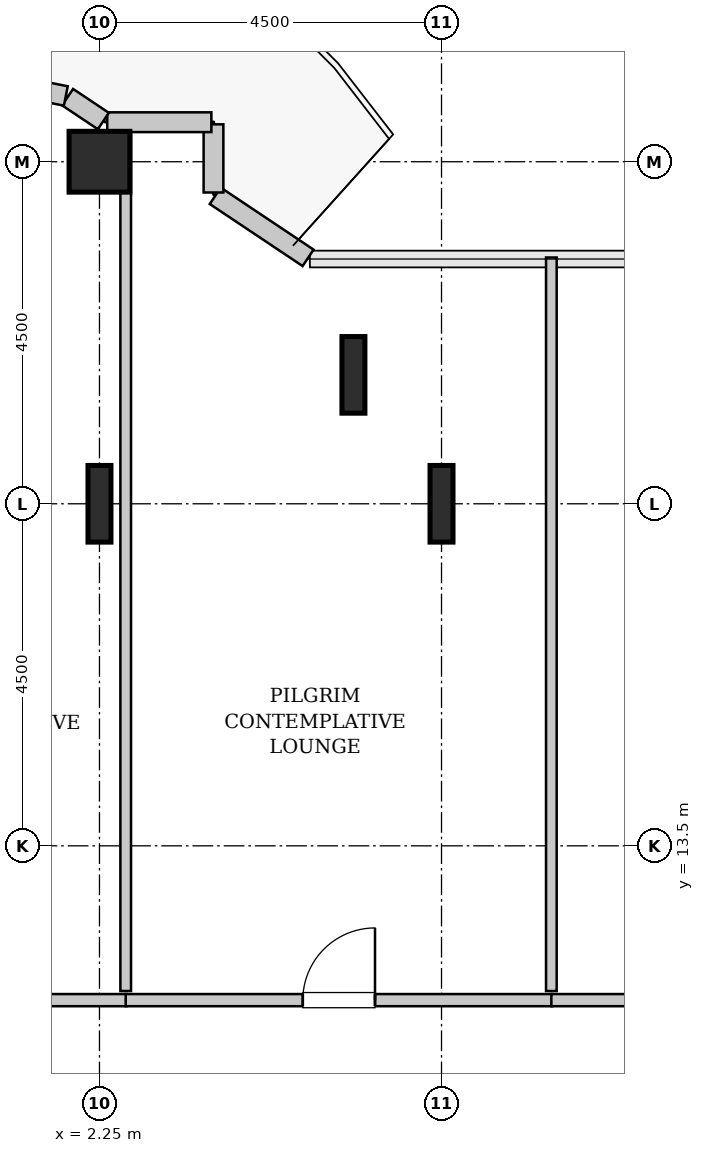
"""IFC4 building model, lengths in metres.
Left out: names, types, materials, properties, quantities, classifications, styles, units other than length and angle.
Written with IfcOpenShell. Run it as: python <this file> out.ifc"""

import sys

from ifc_helpers import new_model, si_unit, direction, frame, frame_2d, origin, origin_2d, place, context, subcontext, project, spatial, rectangle, hollow_rectangle, i_section, extrude, source, transform, mapped, element, fill, save


model = new_model("IFC4")
c1 = context("Model", 3, precision=1e-05, world=origin(), true_north=direction((0.0, 1.0)))
c2 = subcontext(c1, "Body", "Model", "MODEL_VIEW")
j1 = project(units=[si_unit("LENGTHUNIT", "METRE"), si_unit("PLANEANGLEUNIT", "RADIAN")], contexts=[c1])
p1 = place(None, origin())
s1 = spatial("IfcSite", under=j1, at=p1, CompositionType="ELEMENT")
p2 = place(p1, origin())
s2 = spatial("IfcBuilding", under=s1, at=p2, CompositionType="ELEMENT")
p3 = place(p2, frame((0.0, 0.0, 136.4)))
s3 = spatial("IfcBuildingStorey", under=s2, at=p3, CompositionType="ELEMENT", Elevation=136.4)
m1 = source(origin(), c2, "Body", "SweptSolid", [
    extrude(i_section(OverallWidth=0.302, OverallDepth=1.008, WebThickness=0.021, FlangeThickness=0.04, FilletRadius=0.03, at=origin_2d()), origin(), (0.0, 0.0, 1.0), 3.8),
])
p4 = place(p3, frame((2.25, 18.0, 0.0), z_axis=(0.0, 0.0, 1.0), x_axis=(1.0, 0.0, 0.0)))
e1 = element("IfcColumn", 1, at=p4, inside=s3, PredefinedType="COLUMN", context=c2, shape_type="MappedRepresentation", body=[
    mapped(m1, transform((0.0, 0.0, 0.0), x_axis=(1.0, 0.0, 0.0), y_axis=(0.0, 1.0, 0.0), z_axis=(0.0, 0.0, 1.0), scale=1.0)),
])
m2 = source(origin(), c2, "Body", "SweptSolid", [
    extrude(hollow_rectangle(XDim=0.8, YDim=0.8, WallThickness=0.04, InnerFilletRadius=0.04, OuterFilletRadius=0.08, at=origin_2d()), origin(), (0.0, 0.0, 1.0), 3.8),
])
p5 = place(p3, frame((2.25, 22.5, 0.0), z_axis=(0.0, 0.0, 1.0), x_axis=(1.0, 0.0, 0.0)))
e2 = element("IfcColumn", 2, at=p5, inside=s3, PredefinedType="COLUMN", context=c2, shape_type="MappedRepresentation", body=[
    mapped(m2, transform((0.0, 0.0, 0.0), x_axis=(1.0, 0.0, 0.0), y_axis=(0.0, 1.0, 0.0), z_axis=(0.0, 0.0, 1.0), scale=1.0)),
])
for number, where, z_axis, x_axis in (
    (3, (5.591, 19.696, 0.0), (0.0, 0.0, 1.0), (1.0, 0.0, 0.0)),
    (4, (6.75, 18.0, 0.0), (0.0, 0.0, 1.0), (1.0, 0.0, 0.0)),
):
    element("IfcColumn", number, at=place(p3, frame(where, z_axis=z_axis, x_axis=x_axis)), inside=s3, PredefinedType="COLUMN", context=c2, shape_type="MappedRepresentation", body=[
        mapped(m1, transform((0.0, 0.0, 0.0), x_axis=(1.0, 0.0, 0.0), y_axis=(0.0, 1.0, 0.0), z_axis=(0.0, 0.0, 1.0), scale=1.0)),
    ])
m3 = source(origin(), c2, "Body", "SweptSolid", [
    extrude(rectangle(XDim=1.469, YDim=0.26, at=frame_2d((0.734, 0.0))), origin(), (0.0, 0.0, 1.0), 3.55),
])
p6 = place(p3, frame((4.995, 21.236, 0.0), z_axis=(0.0, 0.0, 1.0), x_axis=(-0.831461760506, 0.555581983884, 0.0)))
e5 = element("IfcWall", 5, at=p6, inside=s3, PredefinedType="SOLIDWALL", context=c2, shape_type="MappedRepresentation", body=[
    mapped(m3, transform((0.0, 0.0, 0.0), x_axis=(1.0, 0.0, 0.0), y_axis=(0.0, 1.0, 0.0), z_axis=(0.0, 0.0, 1.0), scale=1.0)),
])
m4 = source(origin(), c2, "Body", "SweptSolid", [
    extrude(rectangle(XDim=0.897, YDim=0.26, at=frame_2d((0.448, 0.0))), origin(), (0.0, 0.0, 1.0), 3.55),
])
p7 = place(p3, frame((3.75, 22.095, 0.0), z_axis=(0.0, 0.0, 1.0), x_axis=(0.0, 1.0, 0.0)))
e6 = element("IfcWall", 6, at=p7, inside=s3, PredefinedType="SOLIDWALL", context=c2, shape_type="MappedRepresentation", body=[
    mapped(m4, transform((0.0, 0.0, 0.0), x_axis=(1.0, 0.0, 0.0), y_axis=(0.0, 1.0, 0.0), z_axis=(0.0, 0.0, 1.0), scale=1.0)),
])
m5 = source(origin(), c2, "Body", "SweptSolid", [
    extrude(rectangle(XDim=1.37, YDim=0.26, at=frame_2d((0.685, 0.0))), origin(), (0.0, 0.0, 1.0), 3.55),
])
p8 = place(p3, frame((3.722, 23.02, 0.0), z_axis=(0.0, 0.0, 1.0), x_axis=(-1.0, 0.0, 0.0)))
e7 = element("IfcWall", 7, at=p8, inside=s3, PredefinedType="SOLIDWALL", context=c2, shape_type="MappedRepresentation", body=[
    mapped(m5, transform((0.0, 0.0, 0.0), x_axis=(1.0, 0.0, 0.0), y_axis=(0.0, 1.0, 0.0), z_axis=(0.0, 0.0, 1.0), scale=1.0)),
])
m6 = source(origin(), c2, "Body", "SweptSolid", [
    extrude(rectangle(XDim=0.565, YDim=0.26, at=frame_2d((0.283, 0.0))), origin(), (0.0, 0.0, 1.0), 3.55),
])
p9 = place(p3, frame((2.301, 23.036, 0.0), z_axis=(0.0, 0.0, 1.0), x_axis=(-0.831651492666, 0.555297933317, 0.0)))
e8 = element("IfcWall", 8, at=p9, inside=s3, PredefinedType="SOLIDWALL", context=c2, shape_type="MappedRepresentation", body=[
    mapped(m6, transform((0.0, 0.0, 0.0), x_axis=(1.0, 0.0, 0.0), y_axis=(0.0, 1.0, 0.0), z_axis=(0.0, 0.0, 1.0), scale=1.0)),
])
m7 = source(origin(), c2, "Body", "SweptSolid", [
    extrude(rectangle(XDim=4.137, YDim=0.26, at=frame_2d((2.068, 0.0))), origin(), (0.0, 0.0, 1.0), 3.55),
])
p10 = place(p3, frame((1.807, 23.365, 0.0), z_axis=(0.0, 0.0, 1.0), x_axis=(-0.980782170794, 0.195105954428, 0.0)))
e9 = element("IfcWall", 9, at=p10, inside=s3, PredefinedType="SOLIDWALL", context=c2, shape_type="MappedRepresentation", body=[
    mapped(m7, transform((0.0, 0.0, 0.0), x_axis=(1.0, 0.0, 0.0), y_axis=(0.0, 1.0, 0.0), z_axis=(0.0, 0.0, 1.0), scale=1.0)),
])
p11 = place(p10, frame((0.488, 0.0, 0.0)))
e10 = element("IfcOpeningElement", 10, at=p11, cuts=e9, PredefinedType="OPENING", context=c2, shape_type="SweptSolid", body=[
    extrude(rectangle(XDim=1.1, YDim=2.2, at=frame_2d((0.55, 1.1))), frame((0.0, 0.14, 0.0), z_axis=(0.0, -1.0, 0.0), x_axis=(1.0, 0.0, 0.0)), (0.0, 0.0, 1.0), 0.28),
])
m8 = source(origin(), c2, "Body", "SweptSolid", [
    extrude(rectangle(XDim=3.505, YDim=0.16, at=frame_2d((1.752, 0.0))), origin(), (0.0, 0.0, 1.0), 3.535),
])
p12 = place(p3, frame((-0.9, 11.47, 0.0), z_axis=(0.0, 0.0, 1.0), x_axis=(1.0, 0.0, 0.0)))
e11 = element("IfcWall", 11, at=p12, inside=s3, PredefinedType="PARTITIONING", context=c2, shape_type="MappedRepresentation", body=[
    mapped(m8, transform((0.0, 0.0, 0.0), x_axis=(1.0, 0.0, 0.0), y_axis=(0.0, 1.0, 0.0), z_axis=(0.0, 0.0, 1.0), scale=1.0)),
])
p13 = place(p12, frame((1.278, 0.0, 0.0)))
e12 = element("IfcOpeningElement", 12, at=p13, cuts=e11, PredefinedType="OPENING", context=c2, shape_type="SweptSolid", body=[
    extrude(rectangle(XDim=0.95, YDim=2.1, at=frame_2d((0.475, 1.05))), frame((0.0, 0.09, 0.0), z_axis=(0.0, -1.0, 0.0), x_axis=(1.0, 0.0, 0.0)), (0.0, 0.0, 1.0), 0.18),
])
m9 = source(origin(), c2, "Body", "SweptSolid", [
    extrude(rectangle(XDim=11.26, YDim=0.14, at=frame_2d((5.63, 0.0))), origin(), (0.0, 0.0, 1.0), 2.875),
])
p14 = place(p3, frame((2.595, 11.59, 0.0), z_axis=(0.0, 0.0, 1.0), x_axis=(0.0, 1.0, 0.0)))
e13 = element("IfcWall", 13, at=p14, inside=s3, PredefinedType="PARTITIONING", context=c2, shape_type="MappedRepresentation", body=[
    mapped(m9, transform((0.0, 0.0, 0.0), x_axis=(1.0, 0.0, 0.0), y_axis=(0.0, 1.0, 0.0), z_axis=(0.0, 0.0, 1.0), scale=1.0)),
])
m10 = source(origin(), c2, "Body", "SweptSolid", [
    extrude(rectangle(XDim=5.61, YDim=0.16, at=frame_2d((2.805, 0.0))), origin(), (0.0, 0.0, 1.0), 3.535),
])
p15 = place(p3, frame((2.595, 11.47, 0.0), z_axis=(0.0, 0.0, 1.0), x_axis=(1.0, 0.0, 0.0)))
e14 = element("IfcWall", 14, at=p15, inside=s3, PredefinedType="PARTITIONING", context=c2, shape_type="MappedRepresentation", body=[
    mapped(m10, transform((0.0, 0.0, 0.0), x_axis=(1.0, 0.0, 0.0), y_axis=(0.0, 1.0, 0.0), z_axis=(0.0, 0.0, 1.0), scale=1.0)),
])
p16 = place(p15, frame((2.33, 0.0, 0.0)))
e15 = element("IfcOpeningElement", 15, at=p16, cuts=e14, PredefinedType="OPENING", context=c2, shape_type="SweptSolid", body=[
    extrude(rectangle(XDim=0.95, YDim=2.1, at=frame_2d((0.475, 1.05))), frame((0.0, 0.09, 0.0), z_axis=(0.0, -1.0, 0.0), x_axis=(1.0, 0.0, 0.0)), (0.0, 0.0, 1.0), 0.18),
])
m11 = source(origin(), c2, "Body", "SweptSolid", [
    extrude(rectangle(XDim=9.65, YDim=0.14, at=frame_2d((4.825, 0.0))), origin(), (0.0, 0.0, 1.0), 3.535),
])
p17 = place(p3, frame((8.195, 11.59, 0.0), z_axis=(0.0, 0.0, 1.0), x_axis=(0.0, 1.0, 0.0)))
e16 = element("IfcWall", 16, at=p17, inside=s3, PredefinedType="PARTITIONING", context=c2, shape_type="MappedRepresentation", body=[
    mapped(m11, transform((0.0, 0.0, 0.0), x_axis=(1.0, 0.0, 0.0), y_axis=(0.0, 1.0, 0.0), z_axis=(0.0, 0.0, 1.0), scale=1.0)),
])
m12 = source(origin(), c2, "Body", "SweptSolid", [
    extrude(rectangle(XDim=5.425, YDim=0.16, at=frame_2d((2.712, 0.0))), origin(), (0.0, 0.0, 1.0), 3.535),
])
p18 = place(p3, frame((8.195, 11.47, 0.0), z_axis=(0.0, 0.0, 1.0), x_axis=(1.0, 0.0, 0.0)))
e17 = element("IfcWall", 17, at=p18, inside=s3, PredefinedType="PARTITIONING", context=c2, shape_type="MappedRepresentation", body=[
    mapped(m12, transform((0.0, 0.0, 0.0), x_axis=(1.0, 0.0, 0.0), y_axis=(0.0, 1.0, 0.0), z_axis=(0.0, 0.0, 1.0), scale=1.0)),
])
p19 = place(p18, frame((2.238, 0.0, 0.0)))
e18 = element("IfcOpeningElement", 18, at=p19, cuts=e17, PredefinedType="OPENING", context=c2, shape_type="SweptSolid", body=[
    extrude(rectangle(XDim=0.95, YDim=2.1, at=frame_2d((0.475, 1.05))), frame((0.0, 0.09, 0.0), z_axis=(0.0, -1.0, 0.0), x_axis=(1.0, 0.0, 0.0)), (0.0, 0.0, 1.0), 0.18),
])
m13 = source(origin(), c2, "Body", "SweptSolid", [
    extrude(rectangle(XDim=0.95, YDim=2.1, at=frame_2d((0.475, 1.05))), frame((0.0, 0.025, 0.0), z_axis=(0.0, -1.0, 0.0), x_axis=(1.0, 0.0, 0.0)), (0.0, 0.0, 1.0), 0.05),
])
p20 = place(p16, origin())
e19 = element("IfcDoor", 19, at=p20, inside=s3, OperationType="SINGLE_SWING_RIGHT", PredefinedType="DOOR", context=c2, shape_type="MappedRepresentation", body=[
    mapped(m13, transform((0.0, 0.0, 0.0), x_axis=(1.0, 0.0, 0.0), y_axis=(0.0, 1.0, 0.0), z_axis=(0.0, 0.0, 1.0), scale=1.0)),
])
fill(e15, e19)
save(model, sys.argv[1])
